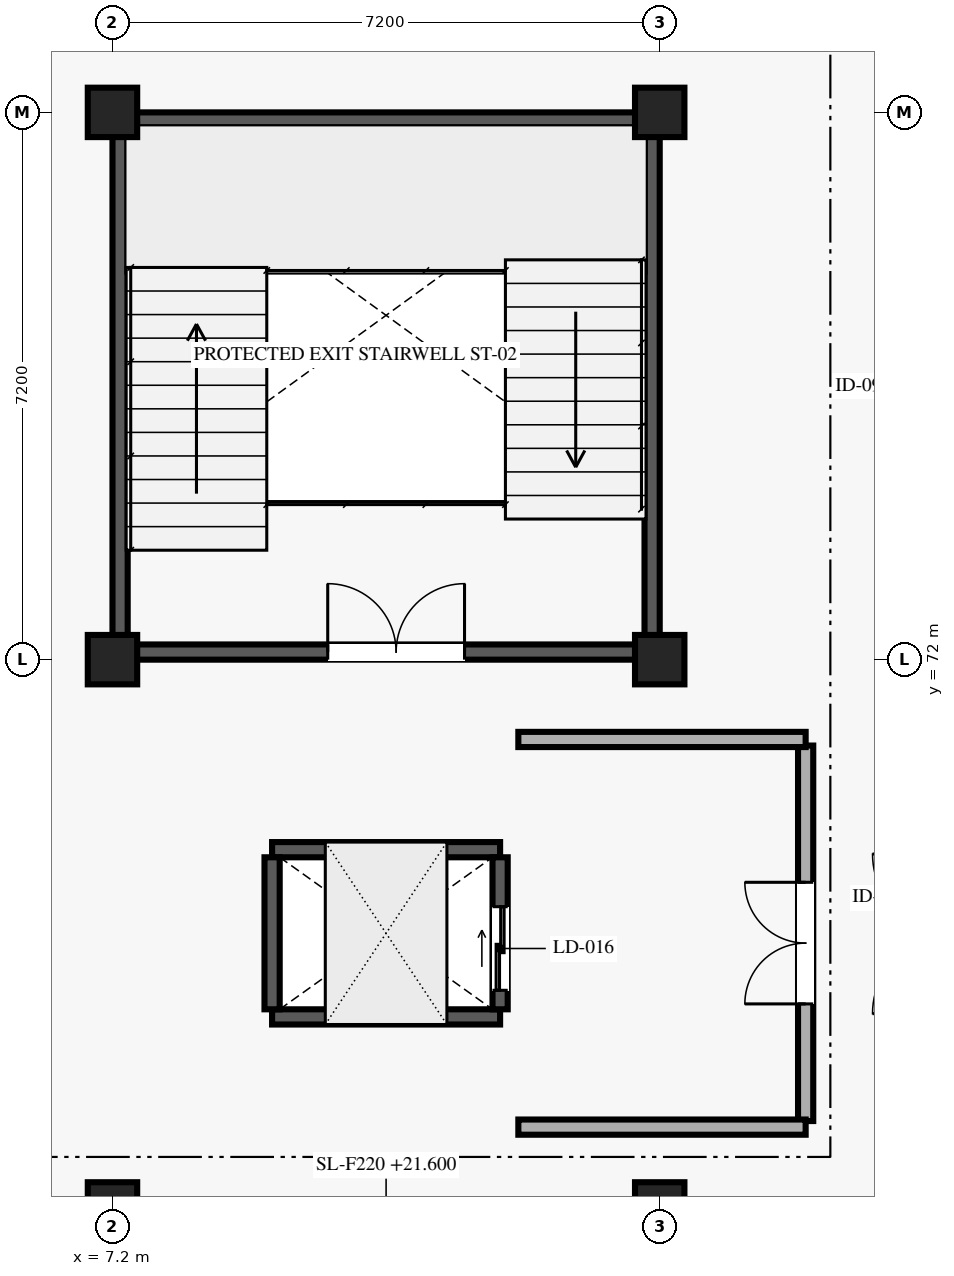
"""IFC4 building model, lengths in metres.
Left out: names, types, materials, properties, quantities, classifications, styles, units other than length and angle.
Written with IfcOpenShell. Run it as: python <this file> out.ifc"""

import sys

from ifc_helpers import new_model, si_unit, direction, frame, frame_2d, origin, origin_2d, place, context, subcontext, project, spatial, rectangle, extrude, element, fill, save


model = new_model("IFC4")
c1 = context("Model", 3, precision=1e-05, world=origin(), true_north=direction((0.0, 1.0)))
c2 = subcontext(c1, "Body", "Model", "MODEL_VIEW")
j1 = project(units=[si_unit("LENGTHUNIT", "METRE"), si_unit("PLANEANGLEUNIT", "RADIAN")], contexts=[c1])
p1 = place(None, origin())
s1 = spatial("IfcSite", under=j1, at=p1, CompositionType="ELEMENT")
p2 = place(p1, origin())
s2 = spatial("IfcBuilding", under=s1, at=p2, CompositionType="ELEMENT")
p3 = place(p2, frame((0.0, 0.0, 21.6)))
s3 = spatial("IfcBuildingStorey", under=s2, at=p3, CompositionType="ELEMENT", Elevation=21.6)
for number, where, z_axis, x_axis in (
    (1, (7.2, 64.8, 0.0), (0.0, 0.0, 1.0), (1.0, 0.0, 0.0)),
    (2, (7.2, 72.0, 0.0), (0.0, 0.0, 1.0), (1.0, 0.0, 0.0)),
    (3, (7.2, 79.2, 0.0), (0.0, 0.0, 1.0), (1.0, 0.0, 0.0)),
    (4, (14.4, 64.8, 0.0), (0.0, 0.0, 1.0), (1.0, 0.0, 0.0)),
    (5, (14.4, 72.0, 0.0), (0.0, 0.0, 1.0), (1.0, 0.0, 0.0)),
    (6, (14.4, 79.2, 0.0), (0.0, 0.0, 1.0), (1.0, 0.0, 0.0)),
):
    element("IfcColumn", number, at=place(p3, frame(where, z_axis=z_axis, x_axis=x_axis)), inside=s3, PredefinedType="COLUMN", context=c2, shape_type="SweptSolid", body=[
        extrude(rectangle(XDim=0.65, YDim=0.65, at=origin_2d()), origin(), (0.0, 0.0, 1.0), 4.05),
    ])
p4 = place(p3, frame((7.4, 72.1, 0.0), z_axis=(0.0, 0.0, 1.0), x_axis=(1.0, 0.0, 0.0)))
e7 = element("IfcWall", 7, at=p4, inside=s3, PredefinedType="SHEAR", context=c2, shape_type="SweptSolid", body=[
    extrude(rectangle(XDim=6.8, YDim=0.2, at=frame_2d((3.4, 0.0))), origin(), (0.0, 0.0, 1.0), 3.83),
])
p5 = place(p4, frame((2.632, 0.0, 0.0)))
e8 = element("IfcOpeningElement", 8, at=p5, cuts=e7, PredefinedType="OPENING", context=c2, shape_type="SweptSolid", body=[
    extrude(rectangle(XDim=1.8, YDim=2.2, at=frame_2d((0.9, 1.1))), frame((0.0, 0.11, 0.0), z_axis=(0.0, -1.0, 0.0), x_axis=(1.0, 0.0, 0.0)), (0.0, 0.0, 1.0), 0.22),
])
for number, where, z_axis, x_axis in (
    (9, (7.4, 79.1, 0.0), (0.0, 0.0, 1.0), (1.0, 0.0, 0.0)),
    (10, (7.3, 72.2, 0.0), (0.0, 0.0, 1.0), (0.0, 1.0, 0.0)),
    (11, (14.3, 72.2, 0.0), (0.0, 0.0, 1.0), (0.0, 1.0, 0.0)),
):
    element("IfcWall", number, at=place(p3, frame(where, z_axis=z_axis, x_axis=x_axis)), inside=s3, PredefinedType="SHEAR", context=c2, shape_type="SweptSolid", body=[
        extrude(rectangle(XDim=6.8, YDim=0.2, at=frame_2d((3.4, 0.0))), origin(), (0.0, 0.0, 1.0), 3.83),
    ])
for number, where, z_axis, x_axis in (
    (12, (9.3, 67.3, 0.0), (0.0, 0.0, 1.0), (1.0, 0.0, 0.0)),
    (13, (9.3, 69.5, 0.0), (0.0, 0.0, 1.0), (1.0, 0.0, 0.0)),
):
    element("IfcWall", number, at=place(p3, frame(where, z_axis=z_axis, x_axis=x_axis)), inside=s3, PredefinedType="SHEAR", context=c2, shape_type="SweptSolid", body=[
        extrude(rectangle(XDim=3.0, YDim=0.2, at=frame_2d((1.5, 0.0))), origin(), (0.0, 0.0, 1.0), 3.83),
    ])
p6 = place(p3, frame((9.3, 67.4, 0.0), z_axis=(0.0, 0.0, 1.0), x_axis=(0.0, 1.0, 0.0)))
e14 = element("IfcWall", 14, at=p6, inside=s3, PredefinedType="SHEAR", context=c2, shape_type="SweptSolid", body=[
    extrude(rectangle(XDim=2.0, YDim=0.2, at=frame_2d((1.0, 0.0))), origin(), (0.0, 0.0, 1.0), 3.83),
])
p7 = place(p3, frame((12.3, 67.4, 0.0), z_axis=(0.0, 0.0, 1.0), x_axis=(0.0, 1.0, 0.0)))
e15 = element("IfcWall", 15, at=p7, inside=s3, PredefinedType="SHEAR", context=c2, shape_type="SweptSolid", body=[
    extrude(rectangle(XDim=2.0, YDim=0.2, at=frame_2d((1.0, 0.0))), origin(), (0.0, 0.0, 1.0), 3.83),
])
p8 = place(p7, frame((0.25, 0.0, 0.0)))
e16 = element("IfcOpeningElement", 16, at=p8, cuts=e15, PredefinedType="OPENING", context=c2, shape_type="SweptSolid", body=[
    extrude(rectangle(XDim=1.1, YDim=2.15, at=frame_2d((0.55, 1.075))), frame((0.0, 0.11, 0.0), z_axis=(0.0, -1.0, 0.0), x_axis=(1.0, 0.0, 0.0)), (0.0, 0.0, 1.0), 0.22),
])
p9 = place(p3, frame((16.32, 65.93, 0.0), z_axis=(0.0, 0.0, 1.0), x_axis=(0.0, 1.0, 0.0)))
e17 = element("IfcWall", 17, at=p9, inside=s3, PredefinedType="SOLIDWALL", context=c2, shape_type="SweptSolid", body=[
    extrude(rectangle(XDim=4.94, YDim=0.2, at=frame_2d((2.47, 0.0))), origin(), (0.0, 0.0, 1.0), 3.83),
])
p10 = place(p9, frame((1.541, 0.0, 0.0)))
e18 = element("IfcOpeningElement", 18, at=p10, cuts=e17, PredefinedType="OPENING", context=c2, shape_type="SweptSolid", body=[
    extrude(rectangle(XDim=1.6, YDim=2.2, at=frame_2d((0.8, 1.1))), frame((0.0, 0.11, 0.0), z_axis=(0.0, -1.0, 0.0), x_axis=(1.0, 0.0, 0.0)), (0.0, 0.0, 1.0), 0.22),
])
for number, where, z_axis, x_axis in (
    (19, (12.54, 65.85, 0.0), (0.0, 0.0, 1.0), (1.0, 0.0, 0.0)),
    (20, (12.54, 70.95, 0.0), (0.0, 0.0, 1.0), (1.0, 0.0, 0.0)),
):
    element("IfcWall", number, at=place(p3, frame(where, z_axis=z_axis, x_axis=x_axis)), inside=s3, PredefinedType="SOLIDWALL", context=c2, shape_type="SweptSolid", body=[
        extrude(rectangle(XDim=3.78, YDim=0.2, at=frame_2d((1.89, 0.0))), origin(), (0.0, 0.0, 1.0), 3.83),
    ])
p11 = place(p5, origin())
e21 = element("IfcDoor", 21, at=p11, inside=s3, OperationType="DOUBLE_DOOR_SINGLE_SWING", PredefinedType="DOOR", context=c2, shape_type="SweptSolid", body=[
    extrude(rectangle(XDim=1.8, YDim=2.2, at=frame_2d((0.9, 1.1))), frame((0.0, 0.025, 0.0), z_axis=(0.0, -1.0, 0.0), x_axis=(1.0, 0.0, 0.0)), (0.0, 0.0, 1.0), 0.05),
])
fill(e8, e21)
p12 = place(p8, origin())
e22 = element("IfcDoor", 22, at=p12, inside=s3, OperationType="DOUBLE_DOOR_SLIDING", PredefinedType="DOOR", context=c2, shape_type="SweptSolid", body=[
    extrude(rectangle(XDim=1.1, YDim=2.15, at=frame_2d((0.55, 1.075))), frame((0.0, 0.025, 0.0), z_axis=(0.0, -1.0, 0.0), x_axis=(1.0, 0.0, 0.0)), (0.0, 0.0, 1.0), 0.05),
])
fill(e16, e22)
p13 = place(p10, origin())
e23 = element("IfcDoor", 23, at=p13, inside=s3, OperationType="DOUBLE_DOOR_SINGLE_SWING", PredefinedType="DOOR", context=c2, shape_type="SweptSolid", body=[
    extrude(rectangle(XDim=1.6, YDim=2.2, at=frame_2d((0.8, 1.1))), frame((0.0, 0.025, 0.0), z_axis=(0.0, -1.0, 0.0), x_axis=(1.0, 0.0, 0.0)), (0.0, 0.0, 1.0), 0.05),
])
fill(e18, e23)
save(model, sys.argv[1])
